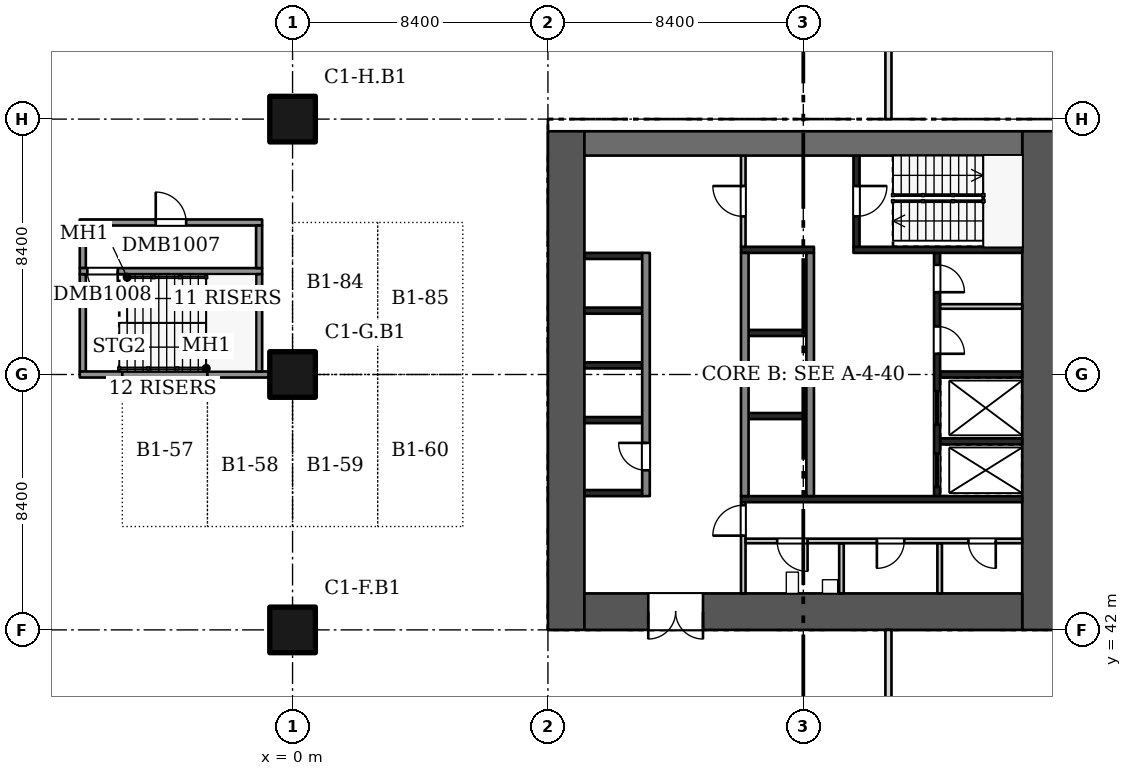
"""IFC4 building model, lengths in metres.
Left out: names, types, materials, properties, quantities, classifications, styles, units other than length and angle.
Written with IfcOpenShell. Run it as: python <this file> out.ifc"""

import sys

from ifc_helpers import new_model, si_unit, direction, frame, frame_2d, origin, origin_2d, place, context, subcontext, project, spatial, rectangle, extrude, element, fill, save


model = new_model("IFC4")
c1 = context("Model", 3, precision=1e-05, world=origin(), true_north=direction((0.0, 1.0)))
c2 = subcontext(c1, "Body", "Model", "MODEL_VIEW")
j1 = project(units=[si_unit("LENGTHUNIT", "METRE"), si_unit("PLANEANGLEUNIT", "RADIAN")], contexts=[c1])
p1 = place(None, origin())
s1 = spatial("IfcSite", under=j1, at=p1, CompositionType="ELEMENT")
p2 = place(p1, origin())
s2 = spatial("IfcBuilding", under=s1, at=p2, CompositionType="ELEMENT")
p3 = place(p2, frame((0.0, 0.0, -4.0)))
s3 = spatial("IfcBuildingStorey", under=s2, at=p3, CompositionType="ELEMENT", Elevation=-4.0)
for number, where, z_axis, x_axis in (
    (1, (0.0, 42.0, 0.0), (0.0, 0.0, 1.0), (1.0, 0.0, 0.0)),
    (2, (0.0, 50.4, 0.0), (0.0, 0.0, 1.0), (1.0, 0.0, 0.0)),
    (3, (0.0, 58.8, 0.0), (0.0, 0.0, 1.0), (1.0, 0.0, 0.0)),
):
    element("IfcColumn", number, at=place(p3, frame(where, z_axis=z_axis, x_axis=x_axis)), inside=s3, PredefinedType="COLUMN", context=c2, shape_type="SweptSolid", body=[
        extrude(rectangle(XDim=1.5, YDim=1.5, at=origin_2d()), origin(), (0.0, 0.0, 1.0), 3.6),
    ])
for number, where, z_axis, x_axis in (
    (4, (9.0, 58.4, 0.0), (0.0, 0.0, 1.0), (0.0, -1.0, 0.0)),
    (5, (24.6, 58.4, 0.0), (0.0, 0.0, 1.0), (0.0, -1.0, 0.0)),
):
    element("IfcWall", number, at=place(p3, frame(where, z_axis=z_axis, x_axis=x_axis)), inside=s3, PredefinedType="SHEAR", context=c2, shape_type="SweptSolid", body=[
        extrude(rectangle(XDim=16.4, YDim=1.2, at=frame_2d((8.2, 0.0))), origin(), (0.0, 0.0, 1.0), 3.6),
    ])
p4 = place(p3, frame((9.6, 58.0, 0.0), z_axis=(0.0, 0.0, 1.0), x_axis=(1.0, 0.0, 0.0)))
e6 = element("IfcWall", 6, at=p4, inside=s3, PredefinedType="SHEAR", context=c2, shape_type="SweptSolid", body=[
    extrude(rectangle(XDim=14.4, YDim=0.8, at=frame_2d((7.2, 0.0))), origin(), (0.0, 0.0, 1.0), 3.6),
])
p5 = place(p3, frame((9.6, 42.6, 0.0), z_axis=(0.0, 0.0, 1.0), x_axis=(1.0, 0.0, 0.0)))
e7 = element("IfcWall", 7, at=p5, inside=s3, PredefinedType="SHEAR", context=c2, shape_type="SweptSolid", body=[
    extrude(rectangle(XDim=14.4, YDim=1.2, at=frame_2d((7.2, 0.0))), origin(), (0.0, 0.0, 1.0), 3.6),
])
p6 = place(p5, frame((2.1, 0.0, 0.0)))
e8 = element("IfcOpeningElement", 8, at=p6, cuts=e7, PredefinedType="OPENING", context=c2, shape_type="SweptSolid", body=[
    extrude(rectangle(XDim=1.8, YDim=2.1, at=frame_2d((0.9, 1.05))), frame((0.0, 0.61, 0.0), z_axis=(0.0, -1.0, 0.0), x_axis=(1.0, 0.0, 0.0)), (0.0, 0.0, 1.0), 1.22),
])
for number, where, z_axis, x_axis in (
    (9, (9.6, 54.3, 0.0), (0.0, 0.0, 1.0), (1.0, 0.0, 0.0)),
    (10, (9.6, 52.5, 0.0), (0.0, 0.0, 1.0), (1.0, 0.0, 0.0)),
    (11, (9.6, 50.7, 0.0), (0.0, 0.0, 1.0), (1.0, 0.0, 0.0)),
    (12, (9.6, 48.9, 0.0), (0.0, 0.0, 1.0), (1.0, 0.0, 0.0)),
    (13, (9.6, 46.5, 0.0), (0.0, 0.0, 1.0), (1.0, 0.0, 0.0)),
):
    element("IfcWall", number, at=place(p3, frame(where, z_axis=z_axis, x_axis=x_axis)), inside=s3, PredefinedType="SHEAR", context=c2, shape_type="SweptSolid", body=[
        extrude(rectangle(XDim=1.9, YDim=0.2, at=frame_2d((0.95, 0.0))), origin(), (0.0, 0.0, 1.0), 3.6),
    ])
p7 = place(p3, frame((11.625, 54.4, 0.0), z_axis=(0.0, 0.0, 1.0), x_axis=(0.0, -1.0, 0.0)))
e14 = element("IfcWall", 14, at=p7, inside=s3, PredefinedType="SHEAR", context=c2, shape_type="SweptSolid", body=[
    extrude(rectangle(XDim=8.0, YDim=0.25, at=frame_2d((4.0, 0.0))), origin(), (0.0, 0.0, 1.0), 3.6),
])
p8 = place(p7, frame((6.25, 0.0, 0.0)))
e15 = element("IfcOpeningElement", 15, at=p8, cuts=e14, PredefinedType="OPENING", context=c2, shape_type="SweptSolid", body=[
    extrude(rectangle(XDim=0.9, YDim=2.1, at=frame_2d((0.45, 1.05))), frame((0.0, 0.135, 0.0), z_axis=(0.0, -1.0, 0.0), x_axis=(1.0, 0.0, 0.0)), (0.0, 0.0, 1.0), 0.27),
])
for number, where, z_axis, x_axis in (
    (16, (15.0, 51.767, 0.0), (0.0, 0.0, 1.0), (1.0, 0.0, 0.0)),
    (17, (15.0, 49.033, 0.0), (0.0, 0.0, 1.0), (1.0, 0.0, 0.0)),
):
    element("IfcWall", number, at=place(p3, frame(where, z_axis=z_axis, x_axis=x_axis)), inside=s3, PredefinedType="SHEAR", context=c2, shape_type="SweptSolid", body=[
        extrude(rectangle(XDim=1.9, YDim=0.2, at=frame_2d((0.95, 0.0))), origin(), (0.0, 0.0, 1.0), 3.6),
    ])
for number, where, z_axis, x_axis in (
    (18, (14.875, 54.4, 0.0), (0.0, 0.0, 1.0), (0.0, -1.0, 0.0)),
    (19, (17.025, 54.4, 0.0), (0.0, 0.0, 1.0), (0.0, -1.0, 0.0)),
):
    element("IfcWall", number, at=place(p3, frame(where, z_axis=z_axis, x_axis=x_axis)), inside=s3, PredefinedType="SHEAR", context=c2, shape_type="SweptSolid", body=[
        extrude(rectangle(XDim=8.0, YDim=0.25, at=frame_2d((4.0, 0.0))), origin(), (0.0, 0.0, 1.0), 3.6),
    ])
for number, where, z_axis, x_axis in (
    (20, (21.3, 50.4, 0.0), (0.0, 0.0, 1.0), (1.0, 0.0, 0.0)),
    (21, (21.3, 48.2, 0.0), (0.0, 0.0, 1.0), (1.0, 0.0, 0.0)),
):
    element("IfcWall", number, at=place(p3, frame(where, z_axis=z_axis, x_axis=x_axis)), inside=s3, PredefinedType="SHEAR", context=c2, shape_type="SweptSolid", body=[
        extrude(rectangle(XDim=2.7, YDim=0.2, at=frame_2d((1.35, 0.0))), origin(), (0.0, 0.0, 1.0), 3.6),
    ])
p9 = place(p3, frame((21.3, 52.637, 0.0), z_axis=(0.0, 0.0, 1.0), x_axis=(1.0, 0.0, 0.0)))
e22 = element("IfcWall", 22, at=p9, inside=s3, PredefinedType="PARTITIONING", context=c2, shape_type="SweptSolid", body=[
    extrude(rectangle(XDim=2.7, YDim=0.15, at=frame_2d((1.35, 0.0))), origin(), (0.0, 0.0, 1.0), 3.6),
])
p10 = place(p3, frame((21.2, 54.4, 0.0), z_axis=(0.0, 0.0, 1.0), x_axis=(0.0, -1.0, 0.0)))
e23 = element("IfcWall", 23, at=p10, inside=s3, PredefinedType="SHEAR", context=c2, shape_type="SweptSolid", body=[
    extrude(rectangle(XDim=8.0, YDim=0.2, at=frame_2d((4.0, 0.0))), origin(), (0.0, 0.0, 1.0), 3.6),
])
p11 = place(p10, frame((0.394, 0.0, 0.0)))
e24 = element("IfcOpeningElement", 24, at=p11, cuts=e23, PredefinedType="OPENING", context=c2, shape_type="SweptSolid", body=[
    extrude(rectangle(XDim=0.9, YDim=2.1, at=frame_2d((0.45, 1.05))), frame((0.0, 0.11, 0.0), z_axis=(0.0, -1.0, 0.0), x_axis=(1.0, 0.0, 0.0)), (0.0, 0.0, 1.0), 0.22),
])
p12 = place(p10, frame((2.419, 0.0, 0.0)))
e25 = element("IfcOpeningElement", 25, at=p12, cuts=e23, PredefinedType="OPENING", context=c2, shape_type="SweptSolid", body=[
    extrude(rectangle(XDim=0.9, YDim=2.1, at=frame_2d((0.45, 1.05))), frame((0.0, 0.11, 0.0), z_axis=(0.0, -1.0, 0.0), x_axis=(1.0, 0.0, 0.0)), (0.0, 0.0, 1.0), 0.22),
])
p13 = place(p10, frame((4.55, 0.0, 0.0)))
e26 = element("IfcOpeningElement", 26, at=p13, cuts=e23, PredefinedType="OPENING", context=c2, shape_type="SweptSolid", body=[
    extrude(rectangle(XDim=1.1, YDim=2.1, at=frame_2d((0.55, 1.05))), frame((0.0, 0.11, 0.0), z_axis=(0.0, -1.0, 0.0), x_axis=(1.0, 0.0, 0.0)), (0.0, 0.0, 1.0), 0.22),
])
p14 = place(p10, frame((6.6, 0.0, 0.0)))
e27 = element("IfcOpeningElement", 27, at=p14, cuts=e23, PredefinedType="OPENING", context=c2, shape_type="SweptSolid", body=[
    extrude(rectangle(XDim=1.1, YDim=2.1, at=frame_2d((0.55, 1.05))), frame((0.0, 0.11, 0.0), z_axis=(0.0, -1.0, 0.0), x_axis=(1.0, 0.0, 0.0)), (0.0, 0.0, 1.0), 0.22),
])
p15 = place(p3, frame((14.75, 54.5, 0.0), z_axis=(0.0, 0.0, 1.0), x_axis=(1.0, 0.0, 0.0)))
e28 = element("IfcWall", 28, at=p15, inside=s3, PredefinedType="SHEAR", context=c2, shape_type="SweptSolid", body=[
    extrude(rectangle(XDim=2.4, YDim=0.2, at=frame_2d((1.2, 0.0))), origin(), (0.0, 0.0, 1.0), 3.6),
])
p16 = place(p3, frame((18.45, 54.5, 0.0), z_axis=(0.0, 0.0, 1.0), x_axis=(1.0, 0.0, 0.0)))
e29 = element("IfcWall", 29, at=p16, inside=s3, PredefinedType="SHEAR", context=c2, shape_type="SweptSolid", body=[
    extrude(rectangle(XDim=5.55, YDim=0.2, at=frame_2d((2.775, 0.0))), origin(), (0.0, 0.0, 1.0), 3.6),
])
p17 = place(p3, frame((14.825, 57.6, 0.0), z_axis=(0.0, 0.0, 1.0), x_axis=(0.0, -1.0, 0.0)))
e30 = element("IfcWall", 30, at=p17, inside=s3, PredefinedType="PARTITIONING", context=c2, shape_type="SweptSolid", body=[
    extrude(rectangle(XDim=3.0, YDim=0.15, at=frame_2d((1.5, 0.0))), origin(), (0.0, 0.0, 1.0), 3.6),
])
p18 = place(p17, frame((1.0, 0.0, 0.0)))
e31 = element("IfcOpeningElement", 31, at=p18, cuts=e30, PredefinedType="OPENING", context=c2, shape_type="SweptSolid", body=[
    extrude(rectangle(XDim=1.0, YDim=2.1, at=frame_2d((0.5, 1.05))), frame((0.0, 0.085, 0.0), z_axis=(0.0, -1.0, 0.0), x_axis=(1.0, 0.0, 0.0)), (0.0, 0.0, 1.0), 0.17),
])
p19 = place(p3, frame((18.55, 57.6, 0.0), z_axis=(0.0, 0.0, 1.0), x_axis=(0.0, -1.0, 0.0)))
e32 = element("IfcWall", 32, at=p19, inside=s3, PredefinedType="SHEAR", context=c2, shape_type="SweptSolid", body=[
    extrude(rectangle(XDim=3.0, YDim=0.2, at=frame_2d((1.5, 0.0))), origin(), (0.0, 0.0, 1.0), 3.6),
])
p20 = place(p19, frame((1.0, 0.0, 0.0)))
e33 = element("IfcOpeningElement", 33, at=p20, cuts=e32, PredefinedType="OPENING", context=c2, shape_type="SweptSolid", body=[
    extrude(rectangle(XDim=1.0, YDim=2.1, at=frame_2d((0.5, 1.05))), frame((0.0, 0.11, 0.0), z_axis=(0.0, -1.0, 0.0), x_axis=(1.0, 0.0, 0.0)), (0.0, 0.0, 1.0), 0.22),
])
p21 = place(p3, frame((14.75, 46.3, 0.0), z_axis=(0.0, 0.0, 1.0), x_axis=(1.0, 0.0, 0.0)))
e34 = element("IfcWall", 34, at=p21, inside=s3, PredefinedType="SHEAR", context=c2, shape_type="SweptSolid", body=[
    extrude(rectangle(XDim=9.25, YDim=0.2, at=frame_2d((4.625, 0.0))), origin(), (0.0, 0.0, 1.0), 3.6),
])
p22 = place(p3, frame((14.825, 46.2, 0.0), z_axis=(0.0, 0.0, 1.0), x_axis=(0.0, -1.0, 0.0)))
e35 = element("IfcWall", 35, at=p22, inside=s3, PredefinedType="PARTITIONING", context=c2, shape_type="SweptSolid", body=[
    extrude(rectangle(XDim=3.0, YDim=0.15, at=frame_2d((1.5, 0.0))), origin(), (0.0, 0.0, 1.0), 3.6),
])
p23 = place(p22, frame((0.1, 0.0, 0.0)))
e36 = element("IfcOpeningElement", 36, at=p23, cuts=e35, PredefinedType="OPENING", context=c2, shape_type="SweptSolid", body=[
    extrude(rectangle(XDim=1.0, YDim=2.1, at=frame_2d((0.5, 1.05))), frame((0.0, 0.085, 0.0), z_axis=(0.0, -1.0, 0.0), x_axis=(1.0, 0.0, 0.0)), (0.0, 0.0, 1.0), 0.17),
])
for number, where, z_axis, x_axis in (
    (37, (18.055, 44.85, 0.0), (0.0, 0.0, 1.0), (0.0, -1.0, 0.0)),
    (38, (21.285, 44.85, 0.0), (0.0, 0.0, 1.0), (0.0, -1.0, 0.0)),
):
    element("IfcWall", number, at=place(p3, frame(where, z_axis=z_axis, x_axis=x_axis)), inside=s3, PredefinedType="PARTITIONING", context=c2, shape_type="SweptSolid", body=[
        extrude(rectangle(XDim=1.65, YDim=0.15, at=frame_2d((0.825, 0.0))), origin(), (0.0, 0.0, 1.0), 3.6),
    ])
p24 = place(p3, frame((14.9, 44.925, 0.0), z_axis=(0.0, 0.0, 1.0), x_axis=(1.0, 0.0, 0.0)))
e39 = element("IfcWall", 39, at=p24, inside=s3, PredefinedType="PARTITIONING", context=c2, shape_type="SweptSolid", body=[
    extrude(rectangle(XDim=9.1, YDim=0.15, at=frame_2d((4.55, 0.0))), origin(), (0.0, 0.0, 1.0), 3.6),
])
p25 = place(p24, frame((1.04, 0.0, 0.0)))
e40 = element("IfcOpeningElement", 40, at=p25, cuts=e39, PredefinedType="OPENING", context=c2, shape_type="SweptSolid", body=[
    extrude(rectangle(XDim=1.0, YDim=2.1, at=frame_2d((0.5, 1.05))), frame((0.0, 0.085, 0.0), z_axis=(0.0, -1.0, 0.0), x_axis=(1.0, 0.0, 0.0)), (0.0, 0.0, 1.0), 0.17),
])
p26 = place(p24, frame((4.32, 0.0, 0.0)))
e41 = element("IfcOpeningElement", 41, at=p26, cuts=e39, PredefinedType="OPENING", context=c2, shape_type="SweptSolid", body=[
    extrude(rectangle(XDim=0.9, YDim=2.1, at=frame_2d((0.45, 1.05))), frame((0.0, 0.085, 0.0), z_axis=(0.0, -1.0, 0.0), x_axis=(1.0, 0.0, 0.0)), (0.0, 0.0, 1.0), 0.17),
])
p27 = place(p24, frame((7.33, 0.0, 0.0)))
e42 = element("IfcOpeningElement", 42, at=p27, cuts=e39, PredefinedType="OPENING", context=c2, shape_type="SweptSolid", body=[
    extrude(rectangle(XDim=0.9, YDim=2.1, at=frame_2d((0.45, 1.05))), frame((0.0, 0.085, 0.0), z_axis=(0.0, -1.0, 0.0), x_axis=(1.0, 0.0, 0.0)), (0.0, 0.0, 1.0), 0.17),
])
p28 = place(p3, frame((-6.9, 50.5, 0.0), z_axis=(0.0, 0.0, 1.0), x_axis=(0.0, 1.0, 0.0)))
e43 = element("IfcWall", 43, at=p28, inside=s3, PredefinedType="SOLIDWALL", context=c2, shape_type="SweptSolid", body=[
    extrude(rectangle(XDim=3.2, YDim=0.2, at=frame_2d((1.6, 0.0))), origin(), (0.0, 0.0, 1.0), 4.0),
])
p29 = place(p3, frame((-7.0, 50.4, 0.0), z_axis=(0.0, 0.0, 1.0), x_axis=(1.0, 0.0, 0.0)))
e44 = element("IfcWall", 44, at=p29, inside=s3, PredefinedType="SOLIDWALL", context=c2, shape_type="SweptSolid", body=[
    extrude(rectangle(XDim=1.4, YDim=0.2, at=frame_2d((0.7, 0.0))), origin(), (0.0, 0.0, 1.0), 4.0),
])
p30 = place(p3, frame((-6.9, 53.9, 0.0), z_axis=(0.0, 0.0, 1.0), x_axis=(0.0, 1.0, 0.0)))
e45 = element("IfcWall", 45, at=p30, inside=s3, PredefinedType="SOLIDWALL", context=c2, shape_type="SweptSolid", body=[
    extrude(rectangle(XDim=1.4, YDim=0.2, at=frame_2d((0.7, 0.0))), origin(), (0.0, 0.0, 1.0), 4.0),
])
p31 = place(p3, frame((-7.0, 53.8, 0.0), z_axis=(0.0, 0.0, 1.0), x_axis=(1.0, 0.0, 0.0)))
e46 = element("IfcWall", 46, at=p31, inside=s3, PredefinedType="SOLIDWALL", context=c2, shape_type="SweptSolid", body=[
    extrude(rectangle(XDim=6.0, YDim=0.2, at=frame_2d((3.0, 0.0))), origin(), (0.0, 0.0, 1.0), 4.0),
])
p32 = place(p31, frame((0.25, 0.0, 0.0)))
e47 = element("IfcOpeningElement", 47, at=p32, cuts=e46, PredefinedType="OPENING", context=c2, shape_type="SweptSolid", body=[
    extrude(rectangle(XDim=1.0, YDim=2.1, at=frame_2d((0.5, 1.05))), frame((0.0, 0.11, 0.0), z_axis=(0.0, -1.0, 0.0), x_axis=(1.0, 0.0, 0.0)), (0.0, 0.0, 1.0), 0.22),
])
p33 = place(p3, frame((-7.0, 55.4, 0.0), z_axis=(0.0, 0.0, 1.0), x_axis=(1.0, 0.0, 0.0)))
e48 = element("IfcWall", 48, at=p33, inside=s3, PredefinedType="SOLIDWALL", context=c2, shape_type="SweptSolid", body=[
    extrude(rectangle(XDim=6.0, YDim=0.2, at=frame_2d((3.0, 0.0))), origin(), (0.0, 0.0, 1.0), 4.0),
])
p34 = place(p33, frame((2.5, 0.0, 0.0)))
e49 = element("IfcOpeningElement", 49, at=p34, cuts=e48, PredefinedType="OPENING", context=c2, shape_type="SweptSolid", body=[
    extrude(rectangle(XDim=1.0, YDim=2.1, at=frame_2d((0.5, 1.05))), frame((0.0, 0.11, 0.0), z_axis=(0.0, -1.0, 0.0), x_axis=(1.0, 0.0, 0.0)), (0.0, 0.0, 1.0), 0.22),
])
p35 = place(p3, frame((-5.6, 50.4, 0.0), z_axis=(0.0, 0.0, 1.0), x_axis=(1.0, 0.0, 0.0)))
e50 = element("IfcWall", 50, at=p35, inside=s3, PredefinedType="SOLIDWALL", context=c2, shape_type="SweptSolid", body=[
    extrude(rectangle(XDim=2.8, YDim=0.2, at=frame_2d((1.4, 0.0))), origin(), (0.0, 0.0, 1.0), 4.0),
])
p36 = place(p3, frame((-2.8, 50.4, 0.0), z_axis=(0.0, 0.0, 1.0), x_axis=(1.0, 0.0, 0.0)))
e51 = element("IfcWall", 51, at=p36, inside=s3, PredefinedType="SOLIDWALL", context=c2, shape_type="SweptSolid", body=[
    extrude(rectangle(XDim=2.05, YDim=0.2, at=frame_2d((1.025, 0.0))), origin(), (0.0, 0.0, 1.0), 4.0),
])
p37 = place(p3, frame((-1.1, 50.5, 0.0), z_axis=(0.0, 0.0, 1.0), x_axis=(0.0, 1.0, 0.0)))
e52 = element("IfcWall", 52, at=p37, inside=s3, PredefinedType="SOLIDWALL", context=c2, shape_type="SweptSolid", body=[
    extrude(rectangle(XDim=3.2, YDim=0.2, at=frame_2d((1.6, 0.0))), origin(), (0.0, 0.0, 1.0), 4.0),
])
p38 = place(p3, frame((-1.1, 53.9, 0.0), z_axis=(0.0, 0.0, 1.0), x_axis=(0.0, 1.0, 0.0)))
e53 = element("IfcWall", 53, at=p38, inside=s3, PredefinedType="SOLIDWALL", context=c2, shape_type="SweptSolid", body=[
    extrude(rectangle(XDim=1.4, YDim=0.2, at=frame_2d((0.7, 0.0))), origin(), (0.0, 0.0, 1.0), 4.0),
])
for number, where, z_axis, x_axis in (
    (54, (19.6, 38.6, 0.0), (0.0, 0.0, 1.0), (0.0, 1.0, 0.0)),
    (55, (19.6, 58.8, 0.0), (0.0, 0.0, 1.0), (0.0, 1.0, 0.0)),
):
    element("IfcWall", number, at=place(p3, frame(where, z_axis=z_axis, x_axis=x_axis)), inside=s3, PredefinedType="PARTITIONING", context=c2, shape_type="SweptSolid", body=[
        extrude(rectangle(XDim=3.4, YDim=0.2, at=frame_2d((1.7, 0.0))), origin(), (0.0, 0.0, 1.0), 3.6),
    ])
p39 = place(p6, frame((1.8, 0.0, 0.0), z_axis=(0.0, 0.0, 1.0), x_axis=(-1.0, 0.0, 0.0)))
e56 = element("IfcDoor", 56, at=p39, inside=s3, OperationType="DOUBLE_DOOR_SINGLE_SWING", PredefinedType="DOOR", context=c2, shape_type="SweptSolid", body=[
    extrude(rectangle(XDim=1.8, YDim=2.1, at=frame_2d((0.9, 1.05))), frame((0.0, 0.025, 0.0), z_axis=(0.0, -1.0, 0.0), x_axis=(1.0, 0.0, 0.0)), (0.0, 0.0, 1.0), 0.05),
])
fill(e8, e56)
p40 = place(p8, frame((0.9, 0.0, 0.0), z_axis=(0.0, 0.0, 1.0), x_axis=(-1.0, 0.0, 0.0)))
e57 = element("IfcDoor", 57, at=p40, inside=s3, OperationType="SINGLE_SWING_RIGHT", PredefinedType="DOOR", context=c2, shape_type="SweptSolid", body=[
    extrude(rectangle(XDim=0.9, YDim=2.1, at=frame_2d((0.45, 1.05))), frame((0.0, 0.025, 0.0), z_axis=(0.0, -1.0, 0.0), x_axis=(1.0, 0.0, 0.0)), (0.0, 0.0, 1.0), 0.05),
])
fill(e15, e57)
p41 = place(p11, origin())
e58 = element("IfcDoor", 58, at=p41, inside=s3, OperationType="SINGLE_SWING_RIGHT", PredefinedType="DOOR", context=c2, shape_type="SweptSolid", body=[
    extrude(rectangle(XDim=0.9, YDim=2.1, at=frame_2d((0.45, 1.05))), frame((0.0, 0.025, 0.0), z_axis=(0.0, -1.0, 0.0), x_axis=(1.0, 0.0, 0.0)), (0.0, 0.0, 1.0), 0.05),
])
fill(e24, e58)
p42 = place(p12, origin())
e59 = element("IfcDoor", 59, at=p42, inside=s3, OperationType="SINGLE_SWING_RIGHT", PredefinedType="DOOR", context=c2, shape_type="SweptSolid", body=[
    extrude(rectangle(XDim=0.9, YDim=2.1, at=frame_2d((0.45, 1.05))), frame((0.0, 0.025, 0.0), z_axis=(0.0, -1.0, 0.0), x_axis=(1.0, 0.0, 0.0)), (0.0, 0.0, 1.0), 0.05),
])
fill(e25, e59)
p43 = place(p13, origin())
e60 = element("IfcDoor", 60, at=p43, inside=s3, OperationType="DOUBLE_DOOR_SLIDING", PredefinedType="DOOR", context=c2, shape_type="SweptSolid", body=[
    extrude(rectangle(XDim=1.1, YDim=2.1, at=frame_2d((0.55, 1.05))), frame((0.0, 0.025, 0.0), z_axis=(0.0, -1.0, 0.0), x_axis=(1.0, 0.0, 0.0)), (0.0, 0.0, 1.0), 0.05),
])
fill(e26, e60)
p44 = place(p14, origin())
e61 = element("IfcDoor", 61, at=p44, inside=s3, OperationType="DOUBLE_DOOR_SLIDING", PredefinedType="DOOR", context=c2, shape_type="SweptSolid", body=[
    extrude(rectangle(XDim=1.1, YDim=2.1, at=frame_2d((0.55, 1.05))), frame((0.0, 0.025, 0.0), z_axis=(0.0, -1.0, 0.0), x_axis=(1.0, 0.0, 0.0)), (0.0, 0.0, 1.0), 0.05),
])
fill(e27, e61)
p45 = place(p18, frame((1.0, 0.0, 0.0), z_axis=(0.0, 0.0, 1.0), x_axis=(-1.0, 0.0, 0.0)))
e62 = element("IfcDoor", 62, at=p45, inside=s3, OperationType="SINGLE_SWING_RIGHT", PredefinedType="DOOR", context=c2, shape_type="SweptSolid", body=[
    extrude(rectangle(XDim=1.0, YDim=2.1, at=frame_2d((0.5, 1.05))), frame((0.0, 0.025, 0.0), z_axis=(0.0, -1.0, 0.0), x_axis=(1.0, 0.0, 0.0)), (0.0, 0.0, 1.0), 0.05),
])
fill(e31, e62)
p46 = place(p20, origin())
e63 = element("IfcDoor", 63, at=p46, inside=s3, OperationType="SINGLE_SWING_LEFT", PredefinedType="DOOR", context=c2, shape_type="SweptSolid", body=[
    extrude(rectangle(XDim=1.0, YDim=2.1, at=frame_2d((0.5, 1.05))), frame((0.0, 0.025, 0.0), z_axis=(0.0, -1.0, 0.0), x_axis=(1.0, 0.0, 0.0)), (0.0, 0.0, 1.0), 0.05),
])
fill(e33, e63)
p47 = place(p23, frame((1.0, 0.0, 0.0), z_axis=(0.0, 0.0, 1.0), x_axis=(-1.0, 0.0, 0.0)))
e64 = element("IfcDoor", 64, at=p47, inside=s3, OperationType="SINGLE_SWING_LEFT", PredefinedType="DOOR", context=c2, shape_type="SweptSolid", body=[
    extrude(rectangle(XDim=1.0, YDim=2.1, at=frame_2d((0.5, 1.05))), frame((0.0, 0.025, 0.0), z_axis=(0.0, -1.0, 0.0), x_axis=(1.0, 0.0, 0.0)), (0.0, 0.0, 1.0), 0.05),
])
fill(e36, e64)
p48 = place(p25, frame((1.0, 0.0, 0.0), z_axis=(0.0, 0.0, 1.0), x_axis=(-1.0, 0.0, 0.0)))
e65 = element("IfcDoor", 65, at=p48, inside=s3, OperationType="SINGLE_SWING_LEFT", PredefinedType="DOOR", context=c2, shape_type="SweptSolid", body=[
    extrude(rectangle(XDim=1.0, YDim=2.1, at=frame_2d((0.5, 1.05))), frame((0.0, 0.025, 0.0), z_axis=(0.0, -1.0, 0.0), x_axis=(1.0, 0.0, 0.0)), (0.0, 0.0, 1.0), 0.05),
])
fill(e40, e65)
p49 = place(p26, frame((0.9, 0.0, 0.0), z_axis=(0.0, 0.0, 1.0), x_axis=(-1.0, 0.0, 0.0)))
e66 = element("IfcDoor", 66, at=p49, inside=s3, OperationType="SINGLE_SWING_RIGHT", PredefinedType="DOOR", context=c2, shape_type="SweptSolid", body=[
    extrude(rectangle(XDim=0.9, YDim=2.1, at=frame_2d((0.45, 1.05))), frame((0.0, 0.025, 0.0), z_axis=(0.0, -1.0, 0.0), x_axis=(1.0, 0.0, 0.0)), (0.0, 0.0, 1.0), 0.05),
])
fill(e41, e66)
p50 = place(p27, frame((0.9, 0.0, 0.0), z_axis=(0.0, 0.0, 1.0), x_axis=(-1.0, 0.0, 0.0)))
e67 = element("IfcDoor", 67, at=p50, inside=s3, OperationType="SINGLE_SWING_LEFT", PredefinedType="DOOR", context=c2, shape_type="SweptSolid", body=[
    extrude(rectangle(XDim=0.9, YDim=2.1, at=frame_2d((0.45, 1.05))), frame((0.0, 0.025, 0.0), z_axis=(0.0, -1.0, 0.0), x_axis=(1.0, 0.0, 0.0)), (0.0, 0.0, 1.0), 0.05),
])
fill(e42, e67)
p51 = place(p34, origin())
e68 = element("IfcDoor", 68, at=p51, inside=s3, OperationType="SINGLE_SWING_LEFT", PredefinedType="DOOR", context=c2, shape_type="SweptSolid", body=[
    extrude(rectangle(XDim=1.0, YDim=2.1, at=frame_2d((0.5, 1.05))), frame((0.0, 0.025, 0.0), z_axis=(0.0, -1.0, 0.0), x_axis=(1.0, 0.0, 0.0)), (0.0, 0.0, 1.0), 0.05),
])
fill(e49, e68)
p52 = place(p32, frame((1.0, 0.0, 0.0), z_axis=(0.0, 0.0, 1.0), x_axis=(-1.0, 0.0, 0.0)))
e69 = element("IfcDoor", 69, at=p52, inside=s3, OperationType="SINGLE_SWING_LEFT", PredefinedType="DOOR", context=c2, shape_type="SweptSolid", body=[
    extrude(rectangle(XDim=1.0, YDim=2.1, at=frame_2d((0.5, 1.05))), frame((0.0, 0.025, 0.0), z_axis=(0.0, -1.0, 0.0), x_axis=(1.0, 0.0, 0.0)), (0.0, 0.0, 1.0), 0.05),
])
fill(e47, e69)
save(model, sys.argv[1])
